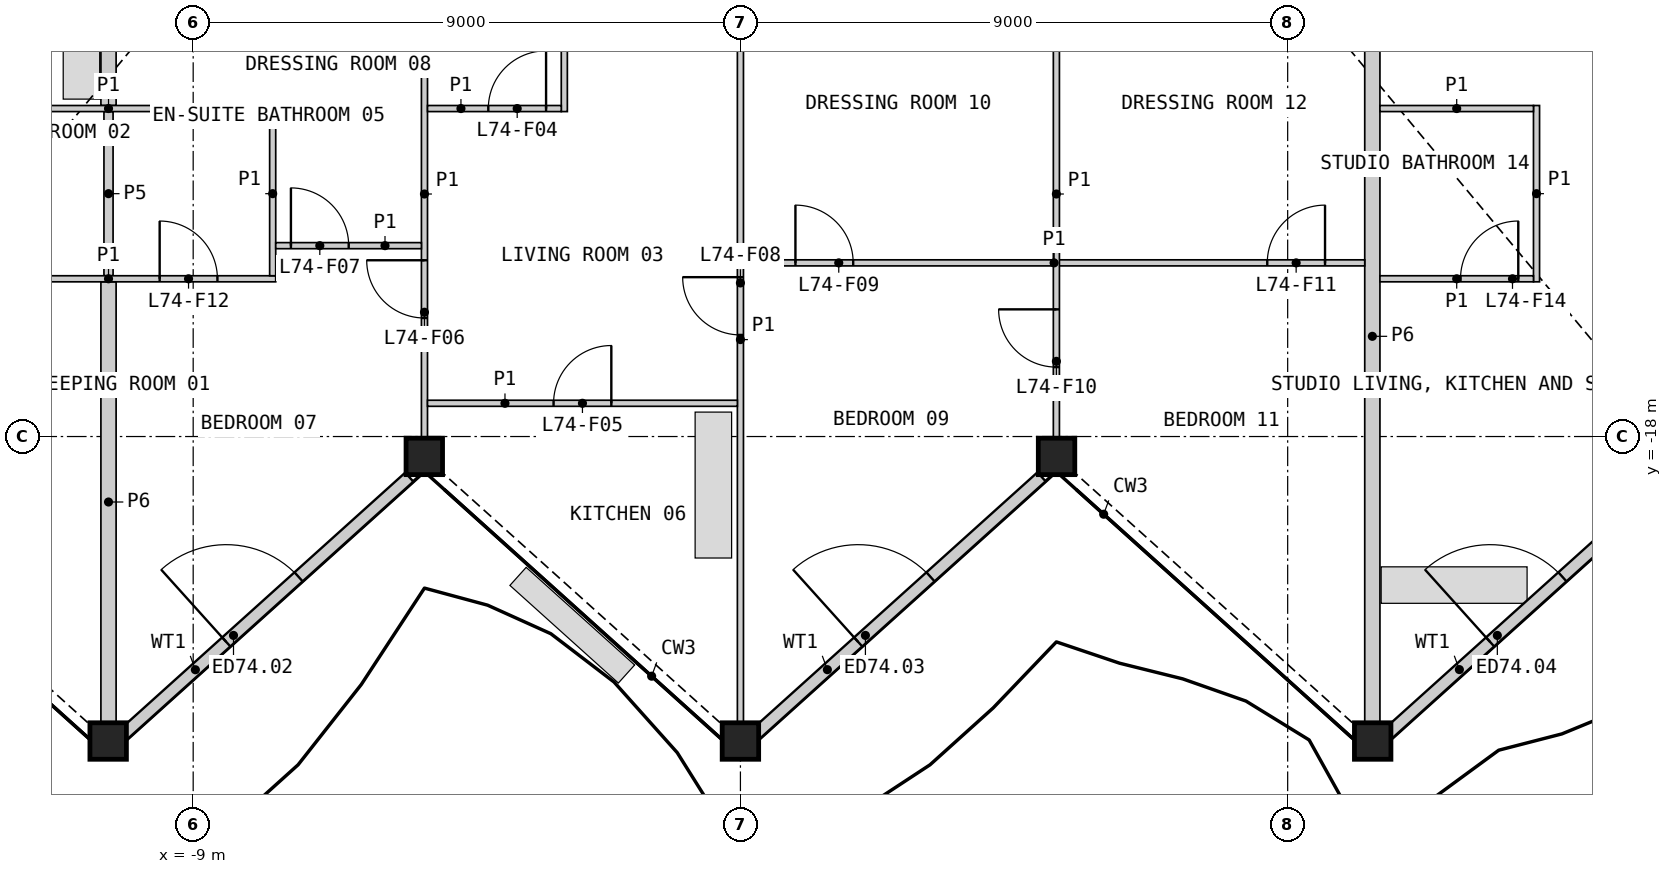
"""IFC4 building model, lengths in metres.
Left out: names, types, materials, properties, quantities, classifications, styles, units other than length and angle.
Written with IfcOpenShell. Run it as: python <this file> out.ifc"""

import sys

from ifc_helpers import new_model, si_unit, direction, frame, frame_2d, origin, origin_2d, place, context, subcontext, project, spatial, rectangle, hollow_rectangle, extrude, element, fill, save


model = new_model("IFC4")
c1 = context("Model", 3, precision=1e-05, world=origin(), true_north=direction((0.0, 1.0)))
c2 = subcontext(c1, "Body", "Model", "MODEL_VIEW")
j1 = project(units=[si_unit("LENGTHUNIT", "METRE"), si_unit("PLANEANGLEUNIT", "RADIAN")], contexts=[c1])
p1 = place(None, origin())
s1 = spatial("IfcSite", under=j1, at=p1, CompositionType="ELEMENT")
p2 = place(p1, origin())
s2 = spatial("IfcBuilding", under=s1, at=p2, CompositionType="ELEMENT")
p3 = place(p2, frame((0.0, 0.0, 332.4)))
s3 = spatial("IfcBuildingStorey", under=s2, at=p3, CompositionType="ELEMENT", Elevation=332.4)
for number, where, z_axis, x_axis in (
    (1, (-10.398, -23.008, 0.0), (0.0, 0.0, 1.0), (1.0, 0.0, 0.0)),
    (2, (-5.199, -18.327, 0.0), (0.0, 0.0, 1.0), (1.0, 0.0, 0.0)),
    (3, (0.0, -23.008, 0.0), (0.0, 0.0, 1.0), (1.0, 0.0, 0.0)),
    (4, (5.199, -18.327, 0.0), (0.0, 0.0, 1.0), (1.0, 0.0, 0.0)),
    (5, (10.398, -23.008, 0.0), (0.0, 0.0, 1.0), (1.0, 0.0, 0.0)),
):
    element("IfcColumn", number, at=place(p3, frame(where, z_axis=z_axis, x_axis=x_axis)), inside=s3, PredefinedType="COLUMN", context=c2, shape_type="SweptSolid", body=[
        extrude(hollow_rectangle(XDim=0.6, YDim=0.6, WallThickness=0.04, at=origin_2d()), origin(), (0.0, 0.0, 1.0), 3.4),
    ])
p4 = place(p3, frame((-10.137, -22.892, 0.0), z_axis=(0.0, 0.0, 1.0), x_axis=(0.743147981531, 0.669127101189, 0.0)))
e6 = element("IfcWall", 6, at=p4, inside=s3, PredefinedType="SOLIDWALL", context=c2, shape_type="SweptSolid", body=[
    extrude(rectangle(XDim=6.313, YDim=0.2, at=frame_2d((3.156, 0.0))), origin(), (0.0, 0.0, 1.0), 2.488),
])
p5 = place(p4, frame((2.262, 0.0, 0.0)))
e7 = element("IfcOpeningElement", 7, at=p5, cuts=e6, PredefinedType="OPENING", context=c2, shape_type="SweptSolid", body=[
    extrude(rectangle(XDim=1.6, YDim=2.25, at=frame_2d((0.8, 1.125))), frame((0.0, 0.11, 0.0), z_axis=(0.0, -1.0, 0.0), x_axis=(1.0, 0.0, 0.0)), (0.0, 0.0, 1.0), 0.22),
])
p6 = place(p3, frame((0.256, -22.892, 0.0), z_axis=(0.0, 0.0, 1.0), x_axis=(0.743142393944, 0.66913330684, 0.0)))
e8 = element("IfcWall", 8, at=p6, inside=s3, PredefinedType="SOLIDWALL", context=c2, shape_type="SweptSolid", body=[
    extrude(rectangle(XDim=6.321, YDim=0.2, at=frame_2d((3.16, 0.0))), origin(), (0.0, 0.0, 1.0), 2.488),
])
p7 = place(p6, frame((2.262, 0.0, 0.0)))
e9 = element("IfcOpeningElement", 9, at=p7, cuts=e8, PredefinedType="OPENING", context=c2, shape_type="SweptSolid", body=[
    extrude(rectangle(XDim=1.6, YDim=2.25, at=frame_2d((0.8, 1.125))), frame((0.0, 0.11, 0.0), z_axis=(0.0, -1.0, 0.0), x_axis=(1.0, 0.0, 0.0)), (0.0, 0.0, 1.0), 0.22),
])
p8 = place(p3, frame((10.648, -22.892, 0.0), z_axis=(0.0, 0.0, 1.0), x_axis=(0.743136819733, 0.669139497532, 0.0)))
e10 = element("IfcWall", 10, at=p8, inside=s3, PredefinedType="SOLIDWALL", context=c2, shape_type="SweptSolid", body=[
    extrude(rectangle(XDim=6.328, YDim=0.2, at=frame_2d((3.164, 0.0))), origin(), (0.0, 0.0, 1.0), 2.488),
])
p9 = place(p8, frame((2.262, 0.0, 0.0)))
e11 = element("IfcOpeningElement", 11, at=p9, cuts=e10, PredefinedType="OPENING", context=c2, shape_type="SweptSolid", body=[
    extrude(rectangle(XDim=1.6, YDim=2.25, at=frame_2d((0.8, 1.125))), frame((0.0, 0.11, 0.0), z_axis=(0.0, -1.0, 0.0), x_axis=(1.0, 0.0, 0.0)), (0.0, 0.0, 1.0), 0.22),
])
p10 = place(p3, frame((13.169, -9.797, 0.0), z_axis=(0.0, 0.0, 1.0), x_axis=(0.4910591841, -0.871126212274, 0.0)))
e12 = element("IfcWall", 12, at=p10, inside=s3, PredefinedType="PARTITIONING", context=c2, shape_type="SweptSolid", body=[
    extrude(rectangle(XDim=14.9, YDim=0.25, at=frame_2d((7.45, 0.0))), origin(), (0.0, 0.0, 1.0), 2.33),
])
p11 = place(p3, frame((10.393, -22.698, 0.0), z_axis=(0.0, 0.0, 1.0), x_axis=(0.0, 1.0, 0.0)))
e13 = element("IfcWall", 13, at=p11, inside=s3, PredefinedType="PARTITIONING", context=c2, shape_type="SweptSolid", body=[
    extrude(rectangle(XDim=12.692, YDim=0.25, at=frame_2d((6.346, 0.0))), origin(), (0.0, 0.0, 1.0), 2.33),
])
p12 = place(p3, frame((-10.393, -22.698, 0.0), z_axis=(0.0, 0.0, 1.0), x_axis=(0.0, 1.0, 0.0)))
e14 = element("IfcWall", 14, at=p12, inside=s3, PredefinedType="PARTITIONING", context=c2, shape_type="SweptSolid", body=[
    extrude(rectangle(XDim=7.242, YDim=0.25, at=frame_2d((3.621, 0.0))), origin(), (0.0, 0.0, 1.0), 2.33),
])
p13 = place(p3, frame((-10.393, -12.556, 0.0), z_axis=(0.0, 0.0, 1.0), x_axis=(0.0, 1.0, 0.0)))
e15 = element("IfcWall", 15, at=p13, inside=s3, PredefinedType="PARTITIONING", context=c2, shape_type="SweptSolid", body=[
    extrude(rectangle(XDim=2.55, YDim=0.25, at=frame_2d((1.275, 0.0))), origin(), (0.0, 0.0, 1.0), 2.33),
])
p14 = place(p3, frame((-10.393, -15.356, 0.0), z_axis=(0.0, 0.0, 1.0), x_axis=(0.0, 1.0, 0.0)))
e16 = element("IfcWall", 16, at=p14, inside=s3, PredefinedType="PLUMBINGWALL", context=c2, shape_type="SweptSolid", body=[
    extrude(rectangle(XDim=2.7, YDim=0.15, at=frame_2d((1.35, 0.0))), origin(), (0.0, 0.0, 1.0), 2.33),
])
p15 = place(p3, frame((0.0, -22.698, 0.0), z_axis=(0.0, 0.0, 1.0), x_axis=(0.0, 1.0, 0.0)))
e17 = element("IfcWall", 17, at=p15, inside=s3, PredefinedType="PARTITIONING", context=c2, shape_type="SweptSolid", body=[
    extrude(rectangle(XDim=12.585, YDim=0.1, at=frame_2d((6.292, 0.0))), origin(), (0.0, 0.0, 1.0), 2.33),
])
p16 = place(p15, frame((6.369, 0.0, 0.0)))
e18 = element("IfcOpeningElement", 18, at=p16, cuts=e17, PredefinedType="OPENING", context=c2, shape_type="SweptSolid", body=[
    extrude(rectangle(XDim=0.95, YDim=2.1, at=frame_2d((0.475, 1.05))), frame((0.0, 0.06, 0.0), z_axis=(0.0, -1.0, 0.0), x_axis=(1.0, 0.0, 0.0)), (0.0, 0.0, 1.0), 0.12),
])
p17 = place(p3, frame((0.05, -15.144, 0.0), z_axis=(0.0, 0.0, 1.0), x_axis=(1.0, 0.0, 0.0)))
e19 = element("IfcWall", 19, at=p17, inside=s3, PredefinedType="PARTITIONING", context=c2, shape_type="SweptSolid", body=[
    extrude(rectangle(XDim=10.218, YDim=0.1, at=frame_2d((5.109, 0.0))), origin(), (0.0, 0.0, 1.0), 2.33),
])
p18 = place(p17, frame((0.855, 0.0, 0.0)))
e20 = element("IfcOpeningElement", 20, at=p18, cuts=e19, PredefinedType="OPENING", context=c2, shape_type="SweptSolid", body=[
    extrude(rectangle(XDim=0.95, YDim=2.1, at=frame_2d((0.475, 1.05))), frame((0.0, 0.06, 0.0), z_axis=(0.0, -1.0, 0.0), x_axis=(1.0, 0.0, 0.0)), (0.0, 0.0, 1.0), 0.12),
])
p19 = place(p17, frame((8.615, 0.0, 0.0)))
e21 = element("IfcOpeningElement", 21, at=p19, cuts=e19, PredefinedType="OPENING", context=c2, shape_type="SweptSolid", body=[
    extrude(rectangle(XDim=0.95, YDim=2.1, at=frame_2d((0.475, 1.05))), frame((0.0, 0.06, 0.0), z_axis=(0.0, -1.0, 0.0), x_axis=(1.0, 0.0, 0.0)), (0.0, 0.0, 1.0), 0.12),
])
p20 = place(p3, frame((-5.196, -18.017, 0.0), z_axis=(0.0, 0.0, 1.0), x_axis=(0.0, 1.0, 0.0)))
e22 = element("IfcWall", 22, at=p20, inside=s3, PredefinedType="PARTITIONING", context=c2, shape_type="SweptSolid", body=[
    extrude(rectangle(XDim=8.011, YDim=0.1, at=frame_2d((4.006, 0.0))), origin(), (0.0, 0.0, 1.0), 2.33),
])
p21 = place(p20, frame((1.966, 0.0, 0.0)))
e23 = element("IfcOpeningElement", 23, at=p21, cuts=e22, PredefinedType="OPENING", context=c2, shape_type="SweptSolid", body=[
    extrude(rectangle(XDim=0.95, YDim=2.1, at=frame_2d((0.475, 1.05))), frame((0.0, 0.06, 0.0), z_axis=(0.0, -1.0, 0.0), x_axis=(1.0, 0.0, 0.0)), (0.0, 0.0, 1.0), 0.12),
])
p22 = place(p3, frame((5.196, -18.017, 0.0), z_axis=(0.0, 0.0, 1.0), x_axis=(0.0, 1.0, 0.0)))
e24 = element("IfcWall", 24, at=p22, inside=s3, PredefinedType="PARTITIONING", context=c2, shape_type="SweptSolid", body=[
    extrude(rectangle(XDim=8.011, YDim=0.1, at=frame_2d((4.006, 0.0))), origin(), (0.0, 0.0, 1.0), 2.33),
])
p23 = place(p22, frame((1.158, 0.0, 0.0)))
e25 = element("IfcOpeningElement", 25, at=p23, cuts=e24, PredefinedType="OPENING", context=c2, shape_type="SweptSolid", body=[
    extrude(rectangle(XDim=0.95, YDim=2.1, at=frame_2d((0.475, 1.05))), frame((0.0, 0.06, 0.0), z_axis=(0.0, -1.0, 0.0), x_axis=(1.0, 0.0, 0.0)), (0.0, 0.0, 1.0), 0.12),
])
p24 = place(p3, frame((-13.143, -12.606, 0.0), z_axis=(0.0, 0.0, 1.0), x_axis=(1.0, 0.0, 0.0)))
e26 = element("IfcWall", 26, at=p24, inside=s3, PredefinedType="PARTITIONING", context=c2, shape_type="SweptSolid", body=[
    extrude(rectangle(XDim=5.5, YDim=0.1, at=frame_2d((2.75, 0.0))), origin(), (0.0, 0.0, 1.0), 2.33),
])
p25 = place(p3, frame((-13.143, -15.406, 0.0), z_axis=(0.0, 0.0, 1.0), x_axis=(1.0, 0.0, 0.0)))
e27 = element("IfcWall", 27, at=p25, inside=s3, PredefinedType="PARTITIONING", context=c2, shape_type="SweptSolid", body=[
    extrude(rectangle(XDim=5.5, YDim=0.1, at=frame_2d((2.75, 0.0))), origin(), (0.0, 0.0, 1.0), 2.33),
])
p26 = place(p25, frame((0.25, 0.0, 0.0)))
e28 = element("IfcOpeningElement", 28, at=p26, cuts=e27, PredefinedType="OPENING", context=c2, shape_type="SweptSolid", body=[
    extrude(rectangle(XDim=0.95, YDim=2.1, at=frame_2d((0.475, 1.05))), frame((0.0, 0.06, 0.0), z_axis=(0.0, -1.0, 0.0), x_axis=(1.0, 0.0, 0.0)), (0.0, 0.0, 1.0), 0.12),
])
p27 = place(p25, frame((3.591, 0.0, 0.0)))
e29 = element("IfcOpeningElement", 29, at=p27, cuts=e27, PredefinedType="OPENING", context=c2, shape_type="SweptSolid", body=[
    extrude(rectangle(XDim=0.95, YDim=2.1, at=frame_2d((0.475, 1.05))), frame((0.0, 0.06, 0.0), z_axis=(0.0, -1.0, 0.0), x_axis=(1.0, 0.0, 0.0)), (0.0, 0.0, 1.0), 0.12),
])
p28 = place(p3, frame((-5.146, -17.453, 0.0), z_axis=(0.0, 0.0, 1.0), x_axis=(1.0, 0.0, 0.0)))
e30 = element("IfcWall", 30, at=p28, inside=s3, PredefinedType="PARTITIONING", context=c2, shape_type="SweptSolid", body=[
    extrude(rectangle(XDim=5.096, YDim=0.1, at=frame_2d((2.548, 0.0))), origin(), (0.0, 0.0, 1.0), 2.33),
])
p29 = place(p28, frame((2.073, 0.0, 0.0)))
e31 = element("IfcOpeningElement", 31, at=p29, cuts=e30, PredefinedType="OPENING", context=c2, shape_type="SweptSolid", body=[
    extrude(rectangle(XDim=0.95, YDim=2.1, at=frame_2d((0.475, 1.05))), frame((0.0, 0.06, 0.0), z_axis=(0.0, -1.0, 0.0), x_axis=(1.0, 0.0, 0.0)), (0.0, 0.0, 1.0), 0.12),
])
p30 = place(p3, frame((-7.692, -15.356, 0.0), z_axis=(0.0, 0.0, 1.0), x_axis=(0.0, 1.0, 0.0)))
e32 = element("IfcWall", 32, at=p30, inside=s3, PredefinedType="PARTITIONING", context=c2, shape_type="SweptSolid", body=[
    extrude(rectangle(XDim=2.7, YDim=0.1, at=frame_2d((1.35, 0.0))), origin(), (0.0, 0.0, 1.0), 2.33),
])
p31 = place(p3, frame((13.093, -15.456, 0.0), z_axis=(0.0, 0.0, 1.0), x_axis=(0.0, 1.0, 0.0)))
e33 = element("IfcWall", 33, at=p31, inside=s3, PredefinedType="PARTITIONING", context=c2, shape_type="SweptSolid", body=[
    extrude(rectangle(XDim=2.9, YDim=0.1, at=frame_2d((1.45, 0.0))), origin(), (0.0, 0.0, 1.0), 2.33),
])
p32 = place(p3, frame((-2.896, -12.656, 0.0), z_axis=(0.0, 0.0, 1.0), x_axis=(0.0, 1.0, 0.0)))
e34 = element("IfcWall", 34, at=p32, inside=s3, PredefinedType="PARTITIONING", context=c2, shape_type="SweptSolid", body=[
    extrude(rectangle(XDim=2.65, YDim=0.1, at=frame_2d((1.325, 0.0))), origin(), (0.0, 0.0, 1.0), 2.33),
])
p33 = place(p3, frame((10.518, -12.606, 0.0), z_axis=(0.0, 0.0, 1.0), x_axis=(1.0, 0.0, 0.0)))
e35 = element("IfcWall", 35, at=p33, inside=s3, PredefinedType="PARTITIONING", context=c2, shape_type="SweptSolid", body=[
    extrude(rectangle(XDim=2.525, YDim=0.1, at=frame_2d((1.262, 0.0))), origin(), (0.0, 0.0, 1.0), 2.33),
])
p34 = place(p3, frame((10.518, -15.406, 0.0), z_axis=(0.0, 0.0, 1.0), x_axis=(1.0, 0.0, 0.0)))
e36 = element("IfcWall", 36, at=p34, inside=s3, PredefinedType="PARTITIONING", context=c2, shape_type="SweptSolid", body=[
    extrude(rectangle(XDim=2.525, YDim=0.1, at=frame_2d((1.262, 0.0))), origin(), (0.0, 0.0, 1.0), 2.33),
])
p35 = place(p34, frame((1.325, 0.0, 0.0)))
e37 = element("IfcOpeningElement", 37, at=p35, cuts=e36, PredefinedType="OPENING", context=c2, shape_type="SweptSolid", body=[
    extrude(rectangle(XDim=0.95, YDim=2.1, at=frame_2d((0.475, 1.05))), frame((0.0, 0.06, 0.0), z_axis=(0.0, -1.0, 0.0), x_axis=(1.0, 0.0, 0.0)), (0.0, 0.0, 1.0), 0.12),
])
p36 = place(p3, frame((-7.643, -14.861, 0.0), z_axis=(0.0, 0.0, 1.0), x_axis=(1.0, 0.0, 0.0)))
e38 = element("IfcWall", 38, at=p36, inside=s3, PredefinedType="PARTITIONING", context=c2, shape_type="SweptSolid", body=[
    extrude(rectangle(XDim=2.396, YDim=0.1, at=frame_2d((1.198, 0.0))), origin(), (0.0, 0.0, 1.0), 2.33),
])
p37 = place(p36, frame((0.25, 0.0, 0.0)))
e39 = element("IfcOpeningElement", 39, at=p37, cuts=e38, PredefinedType="OPENING", context=c2, shape_type="SweptSolid", body=[
    extrude(rectangle(XDim=0.95, YDim=2.1, at=frame_2d((0.475, 1.05))), frame((0.0, 0.06, 0.0), z_axis=(0.0, -1.0, 0.0), x_axis=(1.0, 0.0, 0.0)), (0.0, 0.0, 1.0), 0.12),
])
p38 = place(p3, frame((-5.146, -12.606, 0.0), z_axis=(0.0, 0.0, 1.0), x_axis=(1.0, 0.0, 0.0)))
e40 = element("IfcWall", 40, at=p38, inside=s3, PredefinedType="PARTITIONING", context=c2, shape_type="SweptSolid", body=[
    extrude(rectangle(XDim=2.2, YDim=0.1, at=frame_2d((1.1, 0.0))), origin(), (0.0, 0.0, 1.0), 2.33),
])
p39 = place(p38, frame((1.0, 0.0, 0.0)))
e41 = element("IfcOpeningElement", 41, at=p39, cuts=e40, PredefinedType="OPENING", context=c2, shape_type="SweptSolid", body=[
    extrude(rectangle(XDim=0.95, YDim=2.1, at=frame_2d((0.475, 1.05))), frame((0.0, 0.06, 0.0), z_axis=(0.0, -1.0, 0.0), x_axis=(1.0, 0.0, 0.0)), (0.0, 0.0, 1.0), 0.12),
])
p40 = place(p5, origin())
e42 = element("IfcDoor", 42, at=p40, inside=s3, OperationType="DOUBLE_DOOR_SINGLE_SWING", PredefinedType="DOOR", context=c2, shape_type="SweptSolid", body=[
    extrude(rectangle(XDim=1.6, YDim=2.25, at=frame_2d((0.8, 1.125))), frame((0.0, 0.025, 0.0), z_axis=(0.0, -1.0, 0.0), x_axis=(1.0, 0.0, 0.0)), (0.0, 0.0, 1.0), 0.05),
])
fill(e7, e42)
p41 = place(p7, origin())
e43 = element("IfcDoor", 43, at=p41, inside=s3, OperationType="DOUBLE_DOOR_SINGLE_SWING", PredefinedType="DOOR", context=c2, shape_type="SweptSolid", body=[
    extrude(rectangle(XDim=1.6, YDim=2.25, at=frame_2d((0.8, 1.125))), frame((0.0, 0.025, 0.0), z_axis=(0.0, -1.0, 0.0), x_axis=(1.0, 0.0, 0.0)), (0.0, 0.0, 1.0), 0.05),
])
fill(e9, e43)
p42 = place(p9, origin())
e44 = element("IfcDoor", 44, at=p42, inside=s3, OperationType="DOUBLE_DOOR_SINGLE_SWING", PredefinedType="DOOR", context=c2, shape_type="SweptSolid", body=[
    extrude(rectangle(XDim=1.6, YDim=2.25, at=frame_2d((0.8, 1.125))), frame((0.0, 0.025, 0.0), z_axis=(0.0, -1.0, 0.0), x_axis=(1.0, 0.0, 0.0)), (0.0, 0.0, 1.0), 0.05),
])
fill(e11, e44)
p43 = place(p39, origin())
e45 = element("IfcDoor", 45, at=p43, inside=s3, OperationType="SINGLE_SWING_RIGHT", PredefinedType="DOOR", context=c2, shape_type="SweptSolid", body=[
    extrude(rectangle(XDim=0.95, YDim=2.1, at=frame_2d((0.475, 1.05))), frame((0.0, 0.025, 0.0), z_axis=(0.0, -1.0, 0.0), x_axis=(1.0, 0.0, 0.0)), (0.0, 0.0, 1.0), 0.05),
])
fill(e41, e45)
p44 = place(p29, origin())
e46 = element("IfcDoor", 46, at=p44, inside=s3, OperationType="SINGLE_SWING_RIGHT", PredefinedType="DOOR", context=c2, shape_type="SweptSolid", body=[
    extrude(rectangle(XDim=0.95, YDim=2.1, at=frame_2d((0.475, 1.05))), frame((0.0, 0.025, 0.0), z_axis=(0.0, -1.0, 0.0), x_axis=(1.0, 0.0, 0.0)), (0.0, 0.0, 1.0), 0.05),
])
fill(e31, e46)
p45 = place(p21, origin())
e47 = element("IfcDoor", 47, at=p45, inside=s3, OperationType="SINGLE_SWING_RIGHT", PredefinedType="DOOR", context=c2, shape_type="SweptSolid", body=[
    extrude(rectangle(XDim=0.95, YDim=2.1, at=frame_2d((0.475, 1.05))), frame((0.0, 0.025, 0.0), z_axis=(0.0, -1.0, 0.0), x_axis=(1.0, 0.0, 0.0)), (0.0, 0.0, 1.0), 0.05),
])
fill(e23, e47)
p46 = place(p37, origin())
e48 = element("IfcDoor", 48, at=p46, inside=s3, OperationType="SINGLE_SWING_LEFT", PredefinedType="DOOR", context=c2, shape_type="SweptSolid", body=[
    extrude(rectangle(XDim=0.95, YDim=2.1, at=frame_2d((0.475, 1.05))), frame((0.0, 0.025, 0.0), z_axis=(0.0, -1.0, 0.0), x_axis=(1.0, 0.0, 0.0)), (0.0, 0.0, 1.0), 0.05),
])
fill(e39, e48)
p47 = place(p16, origin())
e49 = element("IfcDoor", 49, at=p47, inside=s3, OperationType="SINGLE_SWING_RIGHT", PredefinedType="DOOR", context=c2, shape_type="SweptSolid", body=[
    extrude(rectangle(XDim=0.95, YDim=2.1, at=frame_2d((0.475, 1.05))), frame((0.0, 0.025, 0.0), z_axis=(0.0, -1.0, 0.0), x_axis=(1.0, 0.0, 0.0)), (0.0, 0.0, 1.0), 0.05),
])
fill(e18, e49)
p48 = place(p18, origin())
e50 = element("IfcDoor", 50, at=p48, inside=s3, OperationType="SINGLE_SWING_LEFT", PredefinedType="DOOR", context=c2, shape_type="SweptSolid", body=[
    extrude(rectangle(XDim=0.95, YDim=2.1, at=frame_2d((0.475, 1.05))), frame((0.0, 0.025, 0.0), z_axis=(0.0, -1.0, 0.0), x_axis=(1.0, 0.0, 0.0)), (0.0, 0.0, 1.0), 0.05),
])
fill(e20, e50)
p49 = place(p23, origin())
e51 = element("IfcDoor", 51, at=p49, inside=s3, OperationType="SINGLE_SWING_RIGHT", PredefinedType="DOOR", context=c2, shape_type="SweptSolid", body=[
    extrude(rectangle(XDim=0.95, YDim=2.1, at=frame_2d((0.475, 1.05))), frame((0.0, 0.025, 0.0), z_axis=(0.0, -1.0, 0.0), x_axis=(1.0, 0.0, 0.0)), (0.0, 0.0, 1.0), 0.05),
])
fill(e25, e51)
p50 = place(p19, origin())
e52 = element("IfcDoor", 52, at=p50, inside=s3, OperationType="SINGLE_SWING_RIGHT", PredefinedType="DOOR", context=c2, shape_type="SweptSolid", body=[
    extrude(rectangle(XDim=0.95, YDim=2.1, at=frame_2d((0.475, 1.05))), frame((0.0, 0.025, 0.0), z_axis=(0.0, -1.0, 0.0), x_axis=(1.0, 0.0, 0.0)), (0.0, 0.0, 1.0), 0.05),
])
fill(e21, e52)
p51 = place(p27, origin())
e53 = element("IfcDoor", 53, at=p51, inside=s3, OperationType="SINGLE_SWING_LEFT", PredefinedType="DOOR", context=c2, shape_type="SweptSolid", body=[
    extrude(rectangle(XDim=0.95, YDim=2.1, at=frame_2d((0.475, 1.05))), frame((0.0, 0.025, 0.0), z_axis=(0.0, -1.0, 0.0), x_axis=(1.0, 0.0, 0.0)), (0.0, 0.0, 1.0), 0.05),
])
fill(e29, e53)
p52 = place(p35, origin())
e54 = element("IfcDoor", 54, at=p52, inside=s3, OperationType="SINGLE_SWING_RIGHT", PredefinedType="DOOR", context=c2, shape_type="SweptSolid", body=[
    extrude(rectangle(XDim=0.95, YDim=2.1, at=frame_2d((0.475, 1.05))), frame((0.0, 0.025, 0.0), z_axis=(0.0, -1.0, 0.0), x_axis=(1.0, 0.0, 0.0)), (0.0, 0.0, 1.0), 0.05),
])
fill(e37, e54)
save(model, sys.argv[1])
